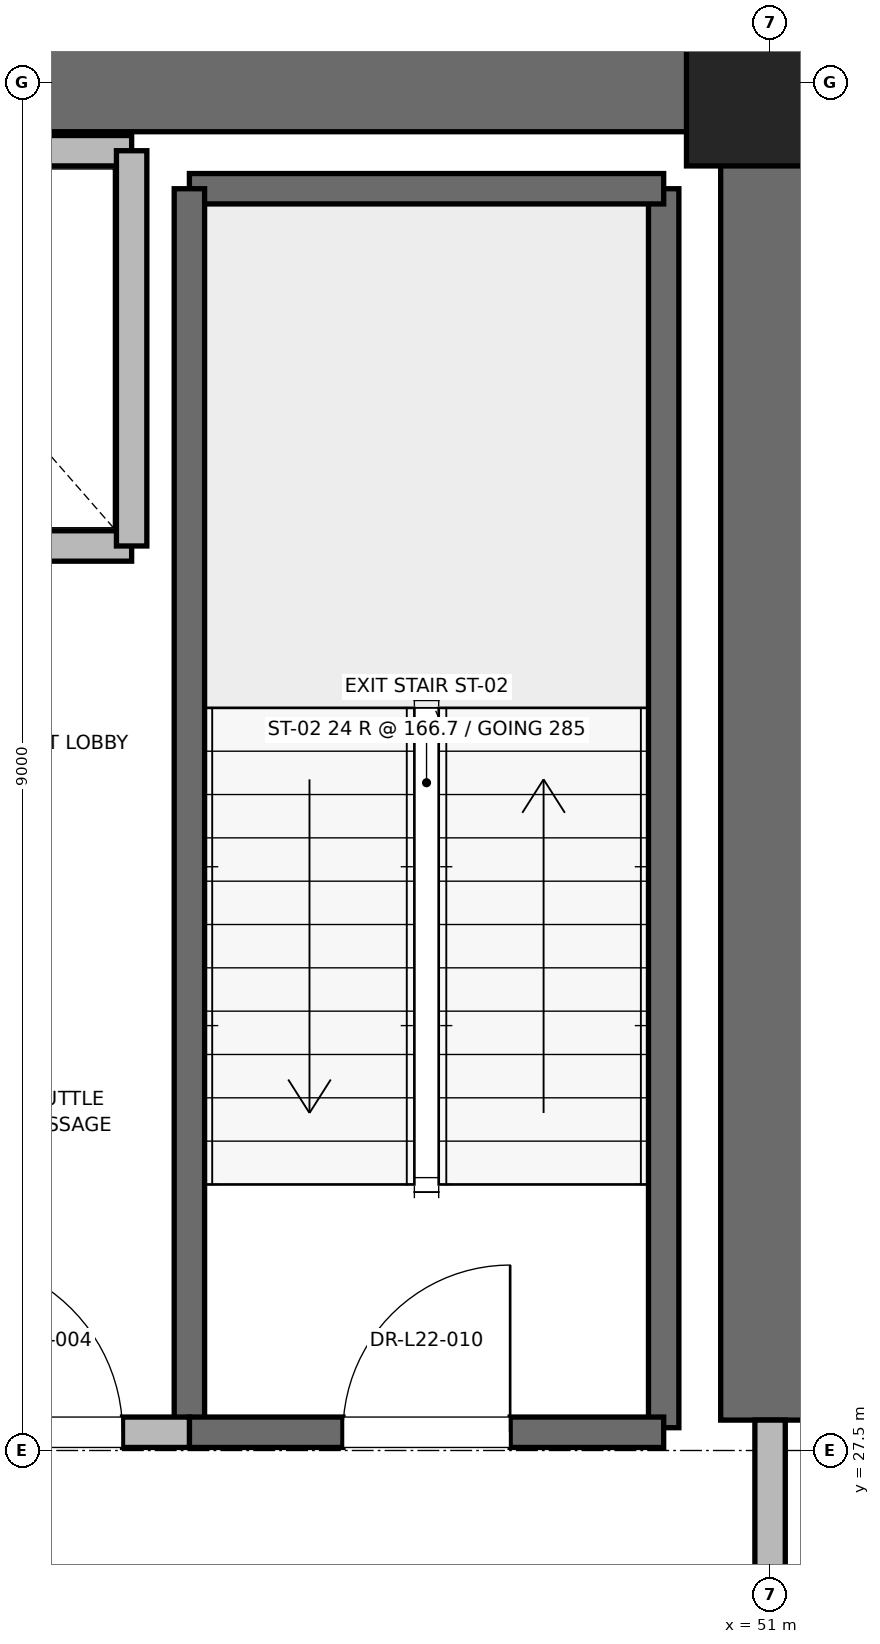
"""IFC4 building model, lengths in metres.
Left out: names, types, materials, properties, quantities, classifications, styles, units other than length and angle.
Written with IfcOpenShell. Run it as: python <this file> out.ifc"""

import sys

from ifc_helpers import new_model, si_unit, direction, frame, frame_2d, origin, origin_2d, place, context, subcontext, project, spatial, rectangle, extrude, element, fill, save


model = new_model("IFC4")
c1 = context("Model", 3, precision=1e-05, world=origin(), true_north=direction((0.0, 1.0)))
c2 = subcontext(c1, "Body", "Model", "MODEL_VIEW")
j1 = project(units=[si_unit("LENGTHUNIT", "METRE"), si_unit("PLANEANGLEUNIT", "RADIAN")], contexts=[c1])
p1 = place(None, origin())
s1 = spatial("IfcSite", under=j1, at=p1, CompositionType="ELEMENT")
p2 = place(p1, origin())
s2 = spatial("IfcBuilding", under=s1, at=p2, CompositionType="ELEMENT")
p3 = place(p2, frame((0.0, 0.0, 95.6)))
s3 = spatial("IfcBuildingStorey", under=s2, at=p3, CompositionType="ELEMENT", Elevation=95.6)
p4 = place(p3, frame((51.0, 36.5, 0.0), z_axis=(0.0, 0.0, 1.0), x_axis=(1.0, 0.0, 0.0)))
e1 = element("IfcColumn", 1, at=p4, inside=s3, PredefinedType="PILASTER", context=c2, shape_type="SweptSolid", body=[
    extrude(rectangle(XDim=1.1, YDim=1.1, at=origin_2d()), origin(), (0.0, 0.0, 1.0), 4.0),
])
p5 = place(p3, frame((45.2, 36.5, 0.0), z_axis=(0.0, 0.0, 1.0), x_axis=(1.0, 0.0, 0.0)))
e2 = element("IfcWall", 2, at=p5, inside=s3, PredefinedType="SHEAR", context=c2, shape_type="SweptSolid", body=[
    extrude(rectangle(XDim=5.8, YDim=0.65, at=frame_2d((2.9, 0.0))), origin(), (0.0, 0.0, 1.0), 3.76),
])
p6 = place(p3, frame((51.0, 27.7, 0.0), z_axis=(0.0, 0.0, 1.0), x_axis=(0.0, 1.0, 0.0)))
e3 = element("IfcWall", 3, at=p6, inside=s3, PredefinedType="SHEAR", context=c2, shape_type="SweptSolid", body=[
    extrude(rectangle(XDim=8.8, YDim=0.65, at=frame_2d((4.4, 0.0))), origin(), (0.0, 0.0, 1.0), 3.76),
])
p7 = place(p3, frame((50.3, 27.65, 0.0), z_axis=(0.0, 0.0, 1.0), x_axis=(0.0, 1.0, 0.0)))
e4 = element("IfcWall", 4, at=p7, inside=s3, PredefinedType="SOLIDWALL", context=c2, shape_type="SweptSolid", body=[
    extrude(rectangle(XDim=8.15, YDim=0.2, at=frame_2d((4.075, 0.0))), origin(), (0.0, 0.0, 1.0), 3.76),
])
p8 = place(p3, frame((47.18, 35.8, 0.0), z_axis=(0.0, 0.0, 1.0), x_axis=(1.0, 0.0, 0.0)))
e5 = element("IfcWall", 5, at=p8, inside=s3, PredefinedType="SOLIDWALL", context=c2, shape_type="SweptSolid", body=[
    extrude(rectangle(XDim=3.12, YDim=0.2, at=frame_2d((1.56, 0.0))), origin(), (0.0, 0.0, 1.0), 3.76),
])
p9 = place(p3, frame((47.18, 27.62, 0.0), z_axis=(0.0, 0.0, 1.0), x_axis=(0.0, 1.0, 0.0)))
e6 = element("IfcWall", 6, at=p9, inside=s3, PredefinedType="SOLIDWALL", context=c2, shape_type="SweptSolid", body=[
    extrude(rectangle(XDim=8.18, YDim=0.2, at=frame_2d((4.09, 0.0))), origin(), (0.0, 0.0, 1.0), 3.76),
])
p10 = place(p3, frame((47.18, 27.62, 0.0), z_axis=(0.0, 0.0, 1.0), x_axis=(1.0, 0.0, 0.0)))
e7 = element("IfcWall", 7, at=p10, inside=s3, PredefinedType="SOLIDWALL", context=c2, shape_type="SweptSolid", body=[
    extrude(rectangle(XDim=3.12, YDim=0.2, at=frame_2d((1.56, 0.0))), origin(), (0.0, 0.0, 1.0), 3.76),
])
p11 = place(p10, frame((1.01, 0.0, 0.0)))
e8 = element("IfcOpeningElement", 8, at=p11, cuts=e7, PredefinedType="OPENING", context=c2, shape_type="SweptSolid", body=[
    extrude(rectangle(XDim=1.1, YDim=2.15, at=frame_2d((0.55, 1.075))), frame((0.0, 0.1, 0.0), z_axis=(0.0, -1.0, 0.0), x_axis=(1.0, 0.0, 0.0)), (0.0, 0.0, 1.0), 0.2),
])
p12 = place(p3, frame((45.15, 27.62, 0.0), z_axis=(0.0, 0.0, 1.0), x_axis=(1.0, 0.0, 0.0)))
e9 = element("IfcWall", 9, at=p12, inside=s3, PredefinedType="PARTITIONING", context=c2, shape_type="SweptSolid", body=[
    extrude(rectangle(XDim=2.03, YDim=0.2, at=frame_2d((1.015, 0.0))), origin(), (0.0, 0.0, 1.0), 3.76),
])
p13 = place(p12, frame((0.44, 0.0, 0.0)))
e10 = element("IfcOpeningElement", 10, at=p13, cuts=e9, PredefinedType="OPENING", context=c2, shape_type="SweptSolid", body=[
    extrude(rectangle(XDim=1.15, YDim=2.2, at=frame_2d((0.575, 1.1))), frame((0.0, 0.1, 0.0), z_axis=(0.0, -1.0, 0.0), x_axis=(1.0, 0.0, 0.0)), (0.0, 0.0, 1.0), 0.2),
])
p14 = place(p3, frame((51.0, 24.3, 0.0), z_axis=(0.0, 0.0, 1.0), x_axis=(0.0, 1.0, 0.0)))
e11 = element("IfcWall", 11, at=p14, inside=s3, PredefinedType="PARTITIONING", context=c2, shape_type="SweptSolid", body=[
    extrude(rectangle(XDim=3.4, YDim=0.2, at=frame_2d((1.7, 0.0))), origin(), (0.0, 0.0, 1.0), 2.54),
])
p15 = place(p14, frame((1.125, 0.0, 0.0)))
e12 = element("IfcOpeningElement", 12, at=p15, cuts=e11, PredefinedType="OPENING", context=c2, shape_type="SweptSolid", body=[
    extrude(rectangle(XDim=1.15, YDim=2.2, at=frame_2d((0.575, 1.1))), frame((0.0, 0.1, 0.0), z_axis=(0.0, -1.0, 0.0), x_axis=(1.0, 0.0, 0.0)), (0.0, 0.0, 1.0), 0.2),
])
p16 = place(p3, frame((44.5, 33.45, 0.0), z_axis=(0.0, 0.0, 1.0), x_axis=(1.0, 0.0, 0.0)))
e13 = element("IfcWall", 13, at=p16, inside=s3, PredefinedType="SOLIDWALL", context=c2, shape_type="SweptSolid", body=[
    extrude(rectangle(XDim=2.3, YDim=0.2, at=frame_2d((1.15, 0.0))), origin(), (0.0, 0.0, 1.0), 3.76),
])
p17 = place(p3, frame((46.8, 36.05, 0.0), z_axis=(0.0, 0.0, 1.0), x_axis=(-1.0, 0.0, 0.0)))
e14 = element("IfcWall", 14, at=p17, inside=s3, PredefinedType="SOLIDWALL", context=c2, shape_type="SweptSolid", body=[
    extrude(rectangle(XDim=2.3, YDim=0.2, at=frame_2d((1.15, 0.0))), origin(), (0.0, 0.0, 1.0), 2.54),
])
p18 = place(p3, frame((46.8, 33.45, 0.0), z_axis=(0.0, 0.0, 1.0), x_axis=(0.0, 1.0, 0.0)))
e15 = element("IfcWall", 15, at=p18, inside=s3, PredefinedType="SOLIDWALL", context=c2, shape_type="SweptSolid", body=[
    extrude(rectangle(XDim=2.6, YDim=0.2, at=frame_2d((1.3, 0.0))), origin(), (0.0, 0.0, 1.0), 3.76),
])
p19 = place(p11, origin())
e16 = element("IfcDoor", 16, at=p19, inside=s3, OperationType="SINGLE_SWING_RIGHT", PredefinedType="DOOR", context=c2, shape_type="SweptSolid", body=[
    extrude(rectangle(XDim=1.1, YDim=2.15, at=frame_2d((0.55, 1.075))), frame((0.0, 0.025, 0.0), z_axis=(0.0, -1.0, 0.0), x_axis=(1.0, 0.0, 0.0)), (0.0, 0.0, 1.0), 0.05),
])
fill(e8, e16)
p20 = place(p13, origin())
e17 = element("IfcDoor", 17, at=p20, inside=s3, OperationType="SINGLE_SWING_LEFT", PredefinedType="DOOR", context=c2, shape_type="SweptSolid", body=[
    extrude(rectangle(XDim=1.15, YDim=2.2, at=frame_2d((0.575, 1.1))), frame((0.0, 0.025, 0.0), z_axis=(0.0, -1.0, 0.0), x_axis=(1.0, 0.0, 0.0)), (0.0, 0.0, 1.0), 0.05),
])
fill(e10, e17)
save(model, sys.argv[1])
